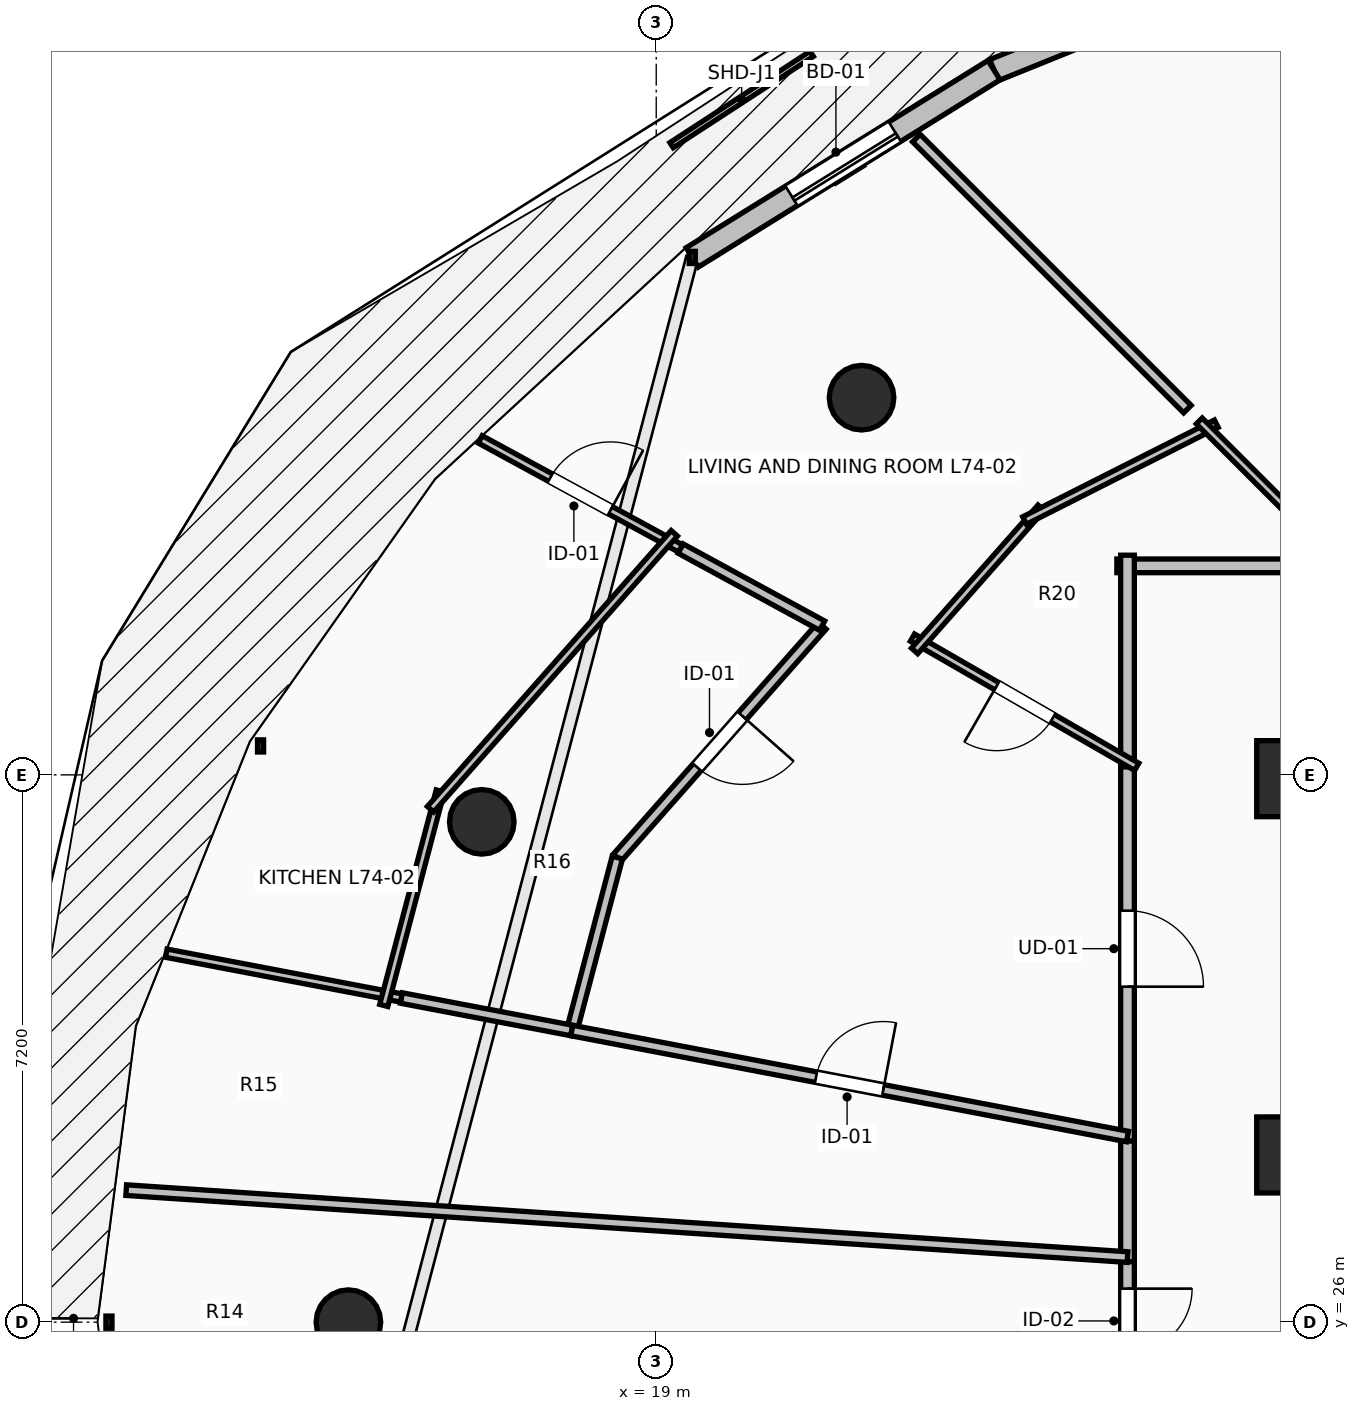
"""IFC4 building model, lengths in metres.
Left out: names, types, materials, properties, quantities, classifications, styles, units other than length and angle.
Written with IfcOpenShell. Run it as: python <this file> out.ifc"""

import sys

from ifc_helpers import new_model, si_unit, direction, frame, frame_2d, origin, origin_2d, place, context, subcontext, project, spatial, rectangle, circle, extrude, element, fill, save


model = new_model("IFC4")
c1 = context("Model", 3, precision=1e-05, world=origin(), true_north=direction((0.0, 1.0)))
c2 = subcontext(c1, "Body", "Model", "MODEL_VIEW")
j1 = project(units=[si_unit("LENGTHUNIT", "METRE"), si_unit("PLANEANGLEUNIT", "RADIAN")], contexts=[c1])
p1 = place(None, origin())
s1 = spatial("IfcSite", under=j1, at=p1, CompositionType="ELEMENT")
p2 = place(p1, origin())
s2 = spatial("IfcBuilding", under=s1, at=p2, CompositionType="ELEMENT")
p3 = place(p2, frame((0.0, 0.0, 273.3)))
s3 = spatial("IfcBuildingStorey", under=s2, at=p3, CompositionType="ELEMENT", Elevation=273.3)
for number, where, z_axis, x_axis in (
    (1, (21.701, 38.162, 0.0), (0.0, 0.0, 1.0), (-0.707, 0.707, 0.0)),
    (2, (16.705, 32.582, 0.0), (0.0, 0.0, 1.0), (-0.924, 0.383, 0.0)),
    (3, (14.95, 26.0, 0.0), (0.0, 0.0, 1.0), (-1.0, 0.0, 0.0)),
):
    element("IfcColumn", number, at=place(p3, frame(where, z_axis=z_axis, x_axis=x_axis)), inside=s3, PredefinedType="COLUMN", context=c2, shape_type="SweptSolid", body=[
        extrude(circle(Radius=0.425, at=origin_2d()), origin(), (0.0, 0.0, 1.0), 3.55),
    ])
for number, where, z_axis, x_axis in (
    (4, (27.25, 28.2, 0.0), (0.0, 0.0, 1.0), (1.0, 0.0, 0.0)),
    (5, (27.25, 33.15, 0.0), (0.0, 0.0, 1.0), (1.0, 0.0, 0.0)),
):
    element("IfcColumn", number, at=place(p3, frame(where, z_axis=z_axis, x_axis=x_axis)), inside=s3, PredefinedType="PILASTER", context=c2, shape_type="SweptSolid", body=[
        extrude(rectangle(XDim=0.7, YDim=1.0, at=origin_2d()), origin(), (0.0, 0.0, 1.0), 3.55),
    ])
p4 = place(p3, frame((27.974, 44.302, 0.0), z_axis=(0.0, 0.0, 1.0), x_axis=(-0.927147375511, -0.374696869594, 0.0)))
e6 = element("IfcWall", 6, at=p4, inside=s3, PredefinedType="STANDARD", context=c2, shape_type="SweptSolid", body=[
    extrude(rectangle(XDim=4.885, YDim=0.3, at=frame_2d((2.443, 0.0))), origin(), (0.0, 0.0, 1.0), 3.29),
])
p5 = place(p4, frame((1.843, 0.0, 0.85)))
e7 = element("IfcOpeningElement", 7, at=p5, cuts=e6, PredefinedType="OPENING", context=c2, shape_type="SweptSolid", body=[
    extrude(rectangle(XDim=1.2, YDim=2.1, at=frame_2d((0.6, 1.05))), frame((0.0, 0.165, 0.0), z_axis=(0.0, -1.0, 0.0), x_axis=(1.0, 0.0, 0.0)), (0.0, 0.0, 1.0), 0.33),
])
p6 = place(p3, frame((23.444, 42.471, 0.0), z_axis=(0.0, 0.0, 1.0), x_axis=(-0.849702323036, -0.527262707032, 0.0)))
e8 = element("IfcWall", 8, at=p6, inside=s3, PredefinedType="STANDARD", context=c2, shape_type="SweptSolid", body=[
    extrude(rectangle(XDim=4.672, YDim=0.3, at=frame_2d((2.336, 0.0))), origin(), (0.0, 0.0, 1.0), 3.29),
])
p7 = place(p6, frame((1.536, 0.0, 0.0)))
e9 = element("IfcOpeningElement", 9, at=p7, cuts=e8, PredefinedType="OPENING", context=c2, shape_type="SweptSolid", body=[
    extrude(rectangle(XDim=1.6, YDim=2.3, at=frame_2d((0.8, 1.15))), frame((0.0, 0.165, 0.0), z_axis=(0.0, -1.0, 0.0), x_axis=(1.0, 0.0, 0.0)), (0.0, 0.0, 1.0), 0.33),
])
p8 = place(p3, frame((25.2, 33.445, 0.0), z_axis=(0.0, 0.0, 1.0), x_axis=(0.0, -1.0, 0.0)))
e10 = element("IfcWall", 10, at=p8, inside=s3, PredefinedType="PARTITIONING", context=c2, shape_type="SweptSolid", body=[
    extrude(rectangle(XDim=5.063, YDim=0.18, at=frame_2d((2.531, 0.0))), origin(), (0.0, 0.0, 1.0), 2.482),
])
p9 = place(p8, frame((2.031, 0.0, 0.0)))
e11 = element("IfcOpeningElement", 11, at=p9, cuts=e10, PredefinedType="OPENING", context=c2, shape_type="SweptSolid", body=[
    extrude(rectangle(XDim=1.0, YDim=2.15, at=frame_2d((0.5, 1.075))), frame((0.0, 0.105, 0.0), z_axis=(0.0, -1.0, 0.0), x_axis=(1.0, 0.0, 0.0)), (0.0, 0.0, 1.0), 0.21),
])
p10 = place(p3, frame((28.25, 35.95, 0.0), z_axis=(0.0, 0.0, 1.0), x_axis=(-1.0, 0.0, 0.0)))
e12 = element("IfcWall", 12, at=p10, inside=s3, PredefinedType="PARTITIONING", context=c2, shape_type="SweptSolid", body=[
    extrude(rectangle(XDim=3.19, YDim=0.18, at=frame_2d((1.595, 0.0))), origin(), (0.0, 0.0, 1.0), 2.482),
])
p11 = place(p3, frame((25.2, 36.09, 0.0), z_axis=(0.0, 0.0, 1.0), x_axis=(0.0, -1.0, 0.0)))
e13 = element("IfcWall", 13, at=p11, inside=s3, PredefinedType="PARTITIONING", context=c2, shape_type="SweptSolid", body=[
    extrude(rectangle(XDim=2.785, YDim=0.18, at=frame_2d((1.393, 0.0))), origin(), (0.0, 0.0, 1.0), 2.482),
])
p12 = place(p3, frame((25.2, 28.382, 0.0), z_axis=(0.0, 0.0, 1.0), x_axis=(0.0, -1.0, 0.0)))
e14 = element("IfcWall", 14, at=p12, inside=s3, PredefinedType="PARTITIONING", context=c2, shape_type="SweptSolid", body=[
    extrude(rectangle(XDim=1.586, YDim=0.18, at=frame_2d((0.793, 0.0))), origin(), (0.0, 0.0, 1.0), 2.482),
])
p13 = place(p3, frame((25.2, 26.796, 0.0), z_axis=(0.0, 0.0, 1.0), x_axis=(0.0, -1.0, 0.0)))
e15 = element("IfcWall", 15, at=p13, inside=s3, PredefinedType="PARTITIONING", context=c2, shape_type="SweptSolid", body=[
    extrude(rectangle(XDim=1.56, YDim=0.18, at=frame_2d((0.78, 0.0))), origin(), (0.0, 0.0, 1.0), 3.29),
])
p14 = place(p13, frame((0.355, 0.0, 0.0)))
e16 = element("IfcOpeningElement", 16, at=p14, cuts=e15, PredefinedType="OPENING", context=c2, shape_type="SweptSolid", body=[
    extrude(rectangle(XDim=0.85, YDim=2.1, at=frame_2d((0.425, 1.05))), frame((0.0, 0.105, 0.0), z_axis=(0.0, -1.0, 0.0), x_axis=(1.0, 0.0, 0.0)), (0.0, 0.0, 1.0), 0.21),
])
p15 = place(p3, frame((25.321, 33.306, 0.0), z_axis=(0.0, 0.0, 1.0), x_axis=(-0.866517217622, 0.49914718427, 0.0)))
e17 = element("IfcWall", 17, at=p15, inside=s3, PredefinedType="PARTITIONING", context=c2, shape_type="SweptSolid", body=[
    extrude(rectangle(XDim=3.405, YDim=0.11, at=frame_2d((1.703, 0.0))), origin(), (0.0, 0.0, 1.0), 2.924),
])
p16 = place(p15, frame((1.278, 0.0, 0.0)))
e18 = element("IfcOpeningElement", 18, at=p16, cuts=e17, PredefinedType="OPENING", context=c2, shape_type="SweptSolid", body=[
    extrude(rectangle(XDim=0.85, YDim=2.1, at=frame_2d((0.425, 1.05))), frame((0.0, 0.07, 0.0), z_axis=(0.0, -1.0, 0.0), x_axis=(1.0, 0.0, 0.0)), (0.0, 0.0, 1.0), 0.14),
])
p17 = place(p3, frame((22.399, 34.831, 0.0), z_axis=(0.0, 0.0, 1.0), x_axis=(0.662292938072, 0.749244996099, 0.0)))
e19 = element("IfcWall", 19, at=p17, inside=s3, PredefinedType="PARTITIONING", context=c2, shape_type="SweptSolid", body=[
    extrude(rectangle(XDim=2.513, YDim=0.11, at=frame_2d((1.256, 0.0))), origin(), (0.0, 0.0, 1.0), 2.482),
])
p18 = place(p3, frame((23.846, 36.546, 0.0), z_axis=(0.0, 0.0, 1.0), x_axis=(0.892553076465, 0.450942352959, 0.0)))
e20 = element("IfcWall", 20, at=p18, inside=s3, PredefinedType="PARTITIONING", context=c2, shape_type="SweptSolid", body=[
    extrude(rectangle(XDim=2.826, YDim=0.11, at=frame_2d((1.413, 0.0))), origin(), (0.0, 0.0, 1.0), 2.482),
])
p19 = place(p3, frame((26.144, 37.856, 0.0), z_axis=(0.0, 0.0, 1.0), x_axis=(0.707106781187, -0.707106781187, 0.0)))
e21 = element("IfcWall", 21, at=p19, inside=s3, PredefinedType="PARTITIONING", context=c2, shape_type="SweptSolid", body=[
    extrude(rectangle(XDim=2.835, YDim=0.11, at=frame_2d((1.418, 0.0))), origin(), (0.0, 0.0, 1.0), 2.482),
])
p20 = place(p3, frame((15.647, 30.265, 0.0), z_axis=(0.0, 0.0, 1.0), x_axis=(-0.982326348308, 0.187176241599, 0.0)))
e22 = element("IfcWall", 22, at=p20, inside=s3, PredefinedType="PARTITIONING", context=c2, shape_type="SweptSolid", body=[
    extrude(rectangle(XDim=3.149, YDim=0.11, at=frame_2d((1.574, 0.0))), origin(), (0.0, 0.0, 1.0), 3.29),
])
p21 = place(p3, frame((16.684, 37.614, 0.0), z_axis=(0.0, 0.0, 1.0), x_axis=(0.878218537438, -0.478259553486, 0.0)))
e23 = element("IfcWall", 23, at=p21, inside=s3, PredefinedType="PARTITIONING", context=c2, shape_type="SweptSolid", body=[
    extrude(rectangle(XDim=3.003, YDim=0.11, at=frame_2d((1.501, 0.0))), origin(), (0.0, 0.0, 1.0), 3.29),
])
p22 = place(p21, frame((1.051, 0.0, 0.0)))
e24 = element("IfcOpeningElement", 24, at=p22, cuts=e23, PredefinedType="OPENING", context=c2, shape_type="SweptSolid", body=[
    extrude(rectangle(XDim=0.9, YDim=2.1, at=frame_2d((0.45, 1.05))), frame((0.0, 0.07, 0.0), z_axis=(0.0, -1.0, 0.0), x_axis=(1.0, 0.0, 0.0)), (0.0, 0.0, 1.0), 0.14),
])
p23 = place(p3, frame((21.183, 35.163, 0.0), z_axis=(0.0, 0.0, 1.0), x_axis=(-0.662034108956, -0.74947370773, 0.0)))
e25 = element("IfcWall", 25, at=p23, inside=s3, PredefinedType="PARTITIONING", context=c2, shape_type="SweptSolid", body=[
    extrude(rectangle(XDim=4.071, YDim=0.14, at=frame_2d((2.035, 0.0))), origin(), (0.0, 0.0, 1.0), 2.482),
])
p24 = place(p23, frame((1.585, 0.0, 0.0)))
e26 = element("IfcOpeningElement", 26, at=p24, cuts=e25, PredefinedType="OPENING", context=c2, shape_type="SweptSolid", body=[
    extrude(rectangle(XDim=0.9, YDim=2.1, at=frame_2d((0.45, 1.05))), frame((0.0, 0.085, 0.0), z_axis=(0.0, -1.0, 0.0), x_axis=(1.0, 0.0, 0.0)), (0.0, 0.0, 1.0), 0.17),
])
p25 = place(p3, frame((18.488, 32.112, 0.0), z_axis=(0.0, 0.0, 1.0), x_axis=(-0.254651639247, -0.967032854989, 0.0)))
e27 = element("IfcWall", 27, at=p25, inside=s3, PredefinedType="PARTITIONING", context=c2, shape_type="SweptSolid", body=[
    extrude(rectangle(XDim=2.353, YDim=0.14, at=frame_2d((1.176, 0.0))), origin(), (0.0, 0.0, 1.0), 2.482),
])
p26 = place(p3, frame((17.889, 29.837, 0.0), z_axis=(0.0, 0.0, 1.0), x_axis=(-0.982294524987, 0.187343177568, 0.0)))
e28 = element("IfcWall", 28, at=p26, inside=s3, PredefinedType="PARTITIONING", context=c2, shape_type="SweptSolid", body=[
    extrude(rectangle(XDim=2.282, YDim=0.14, at=frame_2d((1.141, 0.0))), origin(), (0.0, 0.0, 1.0), 2.874),
])
p27 = place(p3, frame((19.321, 36.177, 0.0), z_axis=(0.0, 0.0, 1.0), x_axis=(0.878172605495, -0.47834388776, 0.0)))
e29 = element("IfcWall", 29, at=p27, inside=s3, PredefinedType="PARTITIONING", context=c2, shape_type="SweptSolid", body=[
    extrude(rectangle(XDim=2.121, YDim=0.14, at=frame_2d((1.06, 0.0))), origin(), (0.0, 0.0, 1.0), 2.874),
])
p28 = place(p3, frame((17.889, 29.837, 0.0), z_axis=(0.0, 0.0, 1.0), x_axis=(0.982284262094, -0.187396980877, 0.0)))
e30 = element("IfcWall", 30, at=p28, inside=s3, PredefinedType="PARTITIONING", context=c2, shape_type="SweptSolid", body=[
    extrude(rectangle(XDim=7.443, YDim=0.14, at=frame_2d((3.721, 0.0))), origin(), (0.0, 0.0, 1.0), 2.924),
])
p29 = place(p28, frame((3.271, 0.0, 0.0)))
e31 = element("IfcOpeningElement", 31, at=p29, cuts=e30, PredefinedType="OPENING", context=c2, shape_type="SweptSolid", body=[
    extrude(rectangle(XDim=0.9, YDim=2.1, at=frame_2d((0.45, 1.05))), frame((0.0, 0.085, 0.0), z_axis=(0.0, -1.0, 0.0), x_axis=(1.0, 0.0, 0.0)), (0.0, 0.0, 1.0), 0.17),
])
p30 = place(p3, frame((15.415, 30.167, 0.0), z_axis=(0.0, 0.0, 1.0), x_axis=(0.254760975284, 0.967004056596, 0.0)))
e32 = element("IfcWall", 32, at=p30, inside=s3, PredefinedType="PARTITIONING", context=c2, shape_type="SweptSolid", body=[
    extrude(rectangle(XDim=2.918, YDim=0.11, at=frame_2d((1.459, 0.0))), origin(), (0.0, 0.0, 1.0), 3.29),
])
p31 = place(p3, frame((16.03, 32.748, 0.0), z_axis=(0.0, 0.0, 1.0), x_axis=(0.662164889187, 0.749358165051, 0.0)))
e33 = element("IfcWall", 33, at=p31, inside=s3, PredefinedType="PARTITIONING", context=c2, shape_type="SweptSolid", body=[
    extrude(rectangle(XDim=4.844, YDim=0.11, at=frame_2d((2.422, 0.0))), origin(), (0.0, 0.0, 1.0), 3.29),
])
p32 = place(p3, frame((12.027, 27.737, 0.0), z_axis=(0.0, 0.0, 1.0), x_axis=(0.997770487114, -0.066738707243, 0.0)))
e34 = element("IfcWall", 34, at=p32, inside=s3, PredefinedType="PARTITIONING", context=c2, shape_type="SweptSolid", body=[
    extrude(rectangle(XDim=13.202, YDim=0.14, at=frame_2d((6.601, 0.0))), origin(), (0.0, 0.0, 1.0), 2.482),
])
p33 = place(p3, frame((25.988, 38.012, 0.0), z_axis=(0.0, 0.0, 1.0), x_axis=(-0.707106781187, 0.707106781187, 0.0)))
e35 = element("IfcWall", 35, at=p33, inside=s3, PredefinedType="PARTITIONING", context=c2, shape_type="SweptSolid", body=[
    extrude(rectangle(XDim=5.043, YDim=0.14, at=frame_2d((2.521, 0.0))), origin(), (0.0, 0.0, 1.0), 2.874),
])
p34 = place(p7, origin())
e36 = element("IfcDoor", 36, at=p34, inside=s3, OperationType="SLIDING_TO_LEFT", PredefinedType="DOOR", context=c2, shape_type="SweptSolid", body=[
    extrude(rectangle(XDim=1.6, YDim=2.3, at=frame_2d((0.8, 1.15))), frame((0.0, 0.025, 0.0), z_axis=(0.0, -1.0, 0.0), x_axis=(1.0, 0.0, 0.0)), (0.0, 0.0, 1.0), 0.05),
])
fill(e9, e36)
p35 = place(p9, origin())
e37 = element("IfcDoor", 37, at=p35, inside=s3, OperationType="SINGLE_SWING_RIGHT", PredefinedType="DOOR", context=c2, shape_type="SweptSolid", body=[
    extrude(rectangle(XDim=1.0, YDim=2.15, at=frame_2d((0.5, 1.075))), frame((0.0, 0.025, 0.0), z_axis=(0.0, -1.0, 0.0), x_axis=(1.0, 0.0, 0.0)), (0.0, 0.0, 1.0), 0.05),
])
fill(e11, e37)
p36 = place(p16, origin())
e38 = element("IfcDoor", 38, at=p36, inside=s3, OperationType="SINGLE_SWING_RIGHT", PredefinedType="DOOR", context=c2, shape_type="SweptSolid", body=[
    extrude(rectangle(XDim=0.85, YDim=2.1, at=frame_2d((0.425, 1.05))), frame((0.0, 0.025, 0.0), z_axis=(0.0, -1.0, 0.0), x_axis=(1.0, 0.0, 0.0)), (0.0, 0.0, 1.0), 0.05),
])
fill(e18, e38)
p37 = place(p22, origin())
e39 = element("IfcDoor", 39, at=p37, inside=s3, OperationType="SINGLE_SWING_RIGHT", PredefinedType="DOOR", context=c2, shape_type="SweptSolid", body=[
    extrude(rectangle(XDim=0.9, YDim=2.1, at=frame_2d((0.45, 1.05))), frame((0.0, 0.025, 0.0), z_axis=(0.0, -1.0, 0.0), x_axis=(1.0, 0.0, 0.0)), (0.0, 0.0, 1.0), 0.05),
])
fill(e24, e39)
p38 = place(p24, origin())
e40 = element("IfcDoor", 40, at=p38, inside=s3, OperationType="SINGLE_SWING_LEFT", PredefinedType="DOOR", context=c2, shape_type="SweptSolid", body=[
    extrude(rectangle(XDim=0.9, YDim=2.1, at=frame_2d((0.45, 1.05))), frame((0.0, 0.025, 0.0), z_axis=(0.0, -1.0, 0.0), x_axis=(1.0, 0.0, 0.0)), (0.0, 0.0, 1.0), 0.05),
])
fill(e26, e40)
p39 = place(p29, origin())
e41 = element("IfcDoor", 41, at=p39, inside=s3, OperationType="SINGLE_SWING_RIGHT", PredefinedType="DOOR", context=c2, shape_type="SweptSolid", body=[
    extrude(rectangle(XDim=0.9, YDim=2.1, at=frame_2d((0.45, 1.05))), frame((0.0, 0.025, 0.0), z_axis=(0.0, -1.0, 0.0), x_axis=(1.0, 0.0, 0.0)), (0.0, 0.0, 1.0), 0.05),
])
fill(e31, e41)
p40 = place(p14, origin())
e42 = element("IfcDoor", 42, at=p40, inside=s3, OperationType="SINGLE_SWING_LEFT", PredefinedType="DOOR", context=c2, shape_type="SweptSolid", body=[
    extrude(rectangle(XDim=0.85, YDim=2.1, at=frame_2d((0.425, 1.05))), frame((0.0, 0.025, 0.0), z_axis=(0.0, -1.0, 0.0), x_axis=(1.0, 0.0, 0.0)), (0.0, 0.0, 1.0), 0.05),
])
fill(e16, e42)
save(model, sys.argv[1])
